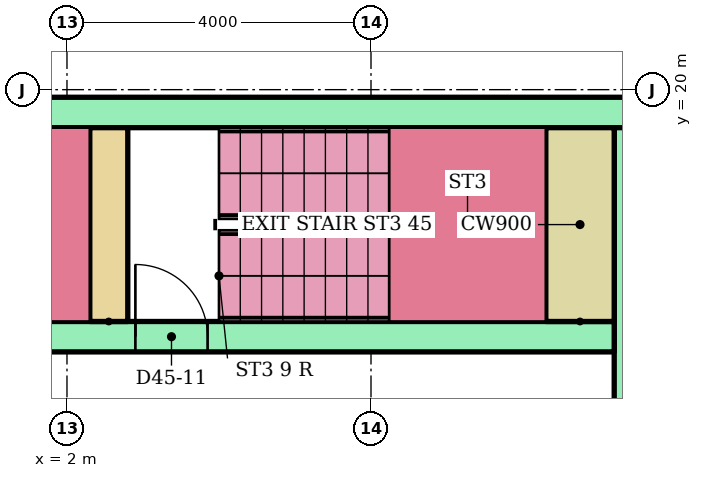
"""IFC4 building model, lengths in metres.
Left out: names, types, materials, properties, quantities, classifications, styles, units other than length and angle.
Written with IfcOpenShell. Run it as: python <this file> out.ifc"""

import sys

from ifc_helpers import new_model, si_unit, direction, frame, frame_2d, origin, place, context, subcontext, project, spatial, rectangle, extrude, element, fill, save


model = new_model("IFC4")
c1 = context("Model", 3, precision=1e-05, world=origin(), true_north=direction((0.0, 1.0)))
c2 = subcontext(c1, "Body", "Model", "MODEL_VIEW")
j1 = project(units=[si_unit("LENGTHUNIT", "METRE"), si_unit("PLANEANGLEUNIT", "RADIAN")], contexts=[c1])
p1 = place(None, origin())
s1 = spatial("IfcSite", under=j1, at=p1, CompositionType="ELEMENT")
p2 = place(p1, origin())
s2 = spatial("IfcBuilding", under=s1, at=p2, CompositionType="ELEMENT")
p3 = place(p2, frame((0.0, 0.0, 174.9)))
s3 = spatial("IfcBuildingStorey", under=s2, at=p3, CompositionType="ELEMENT", Elevation=174.9)
p4 = place(p3, frame((-13.5, 19.7, 0.0)))
e1 = element("IfcWall", 1, at=p4, inside=s3, PredefinedType="SHEAR", context=c2, shape_type="SweptSolid", body=[
    extrude(rectangle(XDim=27.0, YDim=0.4, at=frame_2d((13.5, 0.0))), origin(), (0.0, 0.0, 1.0), 2.92),
])
p5 = place(p3, frame((9.4, 6.8, 0.0), z_axis=(0.0, 0.0, 1.0), x_axis=(0.0, 1.0, 0.0)))
e2 = element("IfcWall", 2, at=p5, inside=s3, PredefinedType="SHEAR", context=c2, shape_type="SweptSolid", body=[
    extrude(rectangle(XDim=12.7, YDim=0.4, at=frame_2d((6.35, 0.0))), origin(), (0.0, 0.0, 1.0), 2.92),
])
p6 = place(p5, frame((0.3, 0.0, 0.0)))
e3 = element("IfcOpeningElement", 3, at=p6, cuts=e2, PredefinedType="OPENING", context=c2, shape_type="SweptSolid", body=[
    extrude(rectangle(XDim=1.0, YDim=2.1, at=frame_2d((0.5, 1.05))), frame((0.0, 0.21, 0.0), z_axis=(0.0, -1.0, 0.0), x_axis=(1.0, 0.0, 0.0)), (0.0, 0.0, 1.0), 0.42),
])
p7 = place(p5, frame((2.05, 0.0, 0.0)))
e4 = element("IfcOpeningElement", 4, at=p7, cuts=e2, PredefinedType="OPENING", context=c2, shape_type="SweptSolid", body=[
    extrude(rectangle(XDim=1.0, YDim=2.1, at=frame_2d((0.5, 1.05))), frame((0.0, 0.21, 0.0), z_axis=(0.0, -1.0, 0.0), x_axis=(1.0, 0.0, 0.0)), (0.0, 0.0, 1.0), 0.42),
])
p8 = place(p5, frame((7.925, 0.0, 0.0)))
e5 = element("IfcOpeningElement", 5, at=p8, cuts=e2, PredefinedType="OPENING", context=c2, shape_type="SweptSolid", body=[
    extrude(rectangle(XDim=1.0, YDim=2.1, at=frame_2d((0.5, 1.05))), frame((0.0, 0.21, 0.0), z_axis=(0.0, -1.0, 0.0), x_axis=(1.0, 0.0, 0.0)), (0.0, 0.0, 1.0), 0.42),
])
p9 = place(p3, frame((-9.2, 16.75, 0.0)))
e6 = element("IfcWall", 6, at=p9, inside=s3, PredefinedType="SHEAR", context=c2, shape_type="SweptSolid", body=[
    extrude(rectangle(XDim=18.4, YDim=0.4, at=frame_2d((9.2, 0.0))), origin(), (0.0, 0.0, 1.0), 2.92),
])
p10 = place(p9, frame((0.1, 0.0, 0.0)))
e7 = element("IfcOpeningElement", 7, at=p10, cuts=e6, PredefinedType="OPENING", context=c2, shape_type="SweptSolid", body=[
    extrude(rectangle(XDim=0.95, YDim=2.1, at=frame_2d((0.475, 1.05))), frame((0.0, 0.21, 0.0), z_axis=(0.0, -1.0, 0.0), x_axis=(1.0, 0.0, 0.0)), (0.0, 0.0, 1.0), 0.42),
])
p11 = place(p9, frame((6.1, 0.0, 0.0)))
e8 = element("IfcOpeningElement", 8, at=p11, cuts=e6, PredefinedType="OPENING", context=c2, shape_type="SweptSolid", body=[
    extrude(rectangle(XDim=0.95, YDim=2.1, at=frame_2d((0.475, 1.05))), frame((0.0, 0.21, 0.0), z_axis=(0.0, -1.0, 0.0), x_axis=(1.0, 0.0, 0.0)), (0.0, 0.0, 1.0), 0.42),
])
p12 = place(p9, frame((12.1, 0.0, 0.0)))
e9 = element("IfcOpeningElement", 9, at=p12, cuts=e6, PredefinedType="OPENING", context=c2, shape_type="SweptSolid", body=[
    extrude(rectangle(XDim=0.95, YDim=2.1, at=frame_2d((0.475, 1.05))), frame((0.0, 0.21, 0.0), z_axis=(0.0, -1.0, 0.0), x_axis=(1.0, 0.0, 0.0)), (0.0, 0.0, 1.0), 0.42),
])
p13 = place(p3, frame((2.55, 16.95, 0.0), z_axis=(0.0, 0.0, 1.0), x_axis=(0.0, 1.0, 0.0)))
e10 = element("IfcWall", 10, at=p13, inside=s3, PredefinedType="SHEAR", context=c2, shape_type="SweptSolid", body=[
    extrude(rectangle(XDim=2.55, YDim=0.5, at=frame_2d((1.275, 0.0))), origin(), (0.0, 0.0, 1.0), 2.92),
])
p14 = place(p3, frame((8.75, 16.95, 0.0), z_axis=(0.0, 0.0, 1.0), x_axis=(0.0, 1.0, 0.0)))
e11 = element("IfcWall", 11, at=p14, inside=s3, PredefinedType="SHEAR", context=c2, shape_type="SweptSolid", body=[
    extrude(rectangle(XDim=2.55, YDim=0.9, at=frame_2d((1.275, 0.0))), origin(), (0.0, 0.0, 1.0), 2.92),
])
p15 = place(p12, origin())
e12 = element("IfcDoor", 12, at=p15, inside=s3, OperationType="SINGLE_SWING_LEFT", PredefinedType="DOOR", context=c2, shape_type="SweptSolid", body=[
    extrude(rectangle(XDim=0.95, YDim=2.1, at=frame_2d((0.475, 1.05))), frame((0.0, 0.025, 0.0), z_axis=(0.0, -1.0, 0.0), x_axis=(1.0, 0.0, 0.0)), (0.0, 0.0, 1.0), 0.05),
])
fill(e9, e12)
save(model, sys.argv[1])
